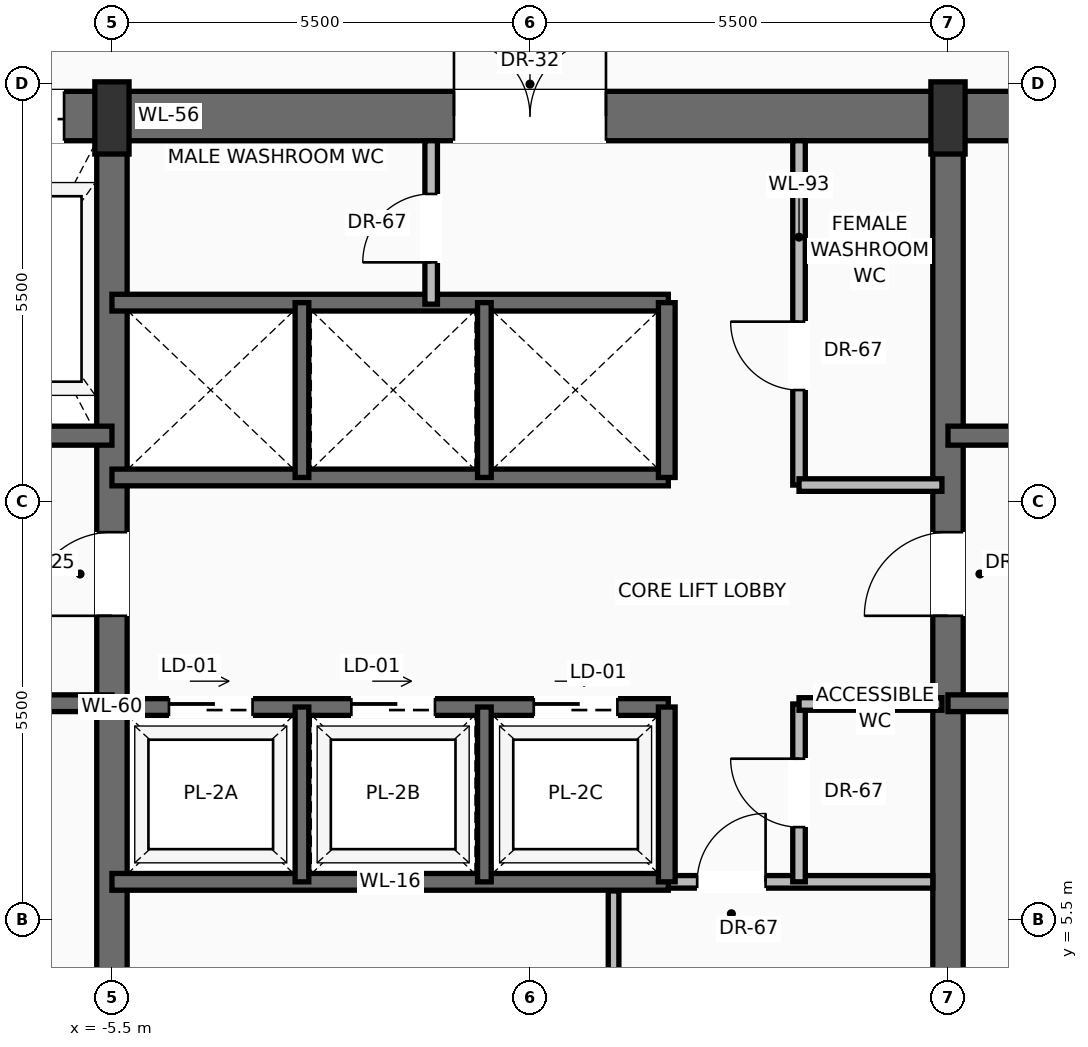
"""IFC4 building model, lengths in metres.
Left out: names, types, materials, properties, quantities, classifications, styles, units other than length and angle.
Written with IfcOpenShell. Run it as: python <this file> out.ifc"""

import sys

from ifc_helpers import new_model, si_unit, direction, frame, frame_2d, origin, origin_2d, place, context, subcontext, project, spatial, rectangle, extrude, source, transform, mapped, element, fill, save


model = new_model("IFC4")
c1 = context("Model", 3, precision=1e-05, world=origin(), true_north=direction((0.0, 1.0)))
c2 = subcontext(c1, "Body", "Model", "MODEL_VIEW")
j1 = project(units=[si_unit("LENGTHUNIT", "METRE"), si_unit("PLANEANGLEUNIT", "RADIAN")], contexts=[c1])
p1 = place(None, origin())
s1 = spatial("IfcSite", under=j1, at=p1, CompositionType="ELEMENT")
p2 = place(p1, origin())
s2 = spatial("IfcBuilding", under=s1, at=p2, CompositionType="ELEMENT")
p3 = place(p2, frame((0.0, 0.0, 178.4)))
s3 = spatial("IfcBuildingStorey", under=s2, at=p3, CompositionType="ELEMENT", Elevation=178.4)
p4 = place(p3, frame((-10.8, 16.075, 0.0), z_axis=(0.0, 0.0, 1.0), x_axis=(1.0, 0.0, 0.0)))
e1 = element("IfcWall", 1, at=p4, inside=s3, PredefinedType="SHEAR", context=c2, shape_type="SweptSolid", body=[
    extrude(rectangle(XDim=21.6, YDim=0.65, at=frame_2d((10.8, 0.0))), origin(), (0.0, 0.0, 1.0), 3.47),
])
p5 = place(p4, frame((3.37, 0.0, 0.0)))
e2 = element("IfcOpeningElement", 2, at=p5, cuts=e1, PredefinedType="OPENING", context=c2, shape_type="SweptSolid", body=[
    extrude(rectangle(XDim=1.3, YDim=2.3, at=frame_2d((0.65, 1.15))), frame((0.0, 0.335, 0.0), z_axis=(0.0, -1.0, 0.0), x_axis=(1.0, 0.0, 0.0)), (0.0, 0.0, 1.0), 0.67),
])
p6 = place(p4, frame((9.8, 0.0, 0.0)))
e3 = element("IfcOpeningElement", 3, at=p6, cuts=e1, PredefinedType="OPENING", context=c2, shape_type="SweptSolid", body=[
    extrude(rectangle(XDim=2.0, YDim=2.4, at=frame_2d((1.0, 1.2))), frame((0.0, 0.335, 0.0), z_axis=(0.0, -1.0, 0.0), x_axis=(1.0, 0.0, 0.0)), (0.0, 0.0, 1.0), 0.67),
])
p7 = place(p3, frame((-5.5, 0.525, 0.0), z_axis=(0.0, 0.0, 1.0), x_axis=(0.0, 1.0, 0.0)))
e4 = element("IfcWall", 4, at=p7, inside=s3, PredefinedType="SHEAR", context=c2, shape_type="SweptSolid", body=[
    extrude(rectangle(XDim=15.55, YDim=0.4, at=frame_2d((7.775, 0.0))), origin(), (0.0, 0.0, 1.0), 3.47),
])
p8 = place(p7, frame((8.975, 0.0, 0.0)))
e5 = element("IfcOpeningElement", 5, at=p8, cuts=e4, PredefinedType="OPENING", context=c2, shape_type="SweptSolid", body=[
    extrude(rectangle(XDim=1.1, YDim=2.2, at=frame_2d((0.55, 1.1))), frame((0.0, 0.21, 0.0), z_axis=(0.0, -1.0, 0.0), x_axis=(1.0, 0.0, 0.0)), (0.0, 0.0, 1.0), 0.42),
])
p9 = place(p3, frame((5.5, 0.525, 0.0), z_axis=(0.0, 0.0, 1.0), x_axis=(0.0, 1.0, 0.0)))
e6 = element("IfcWall", 6, at=p9, inside=s3, PredefinedType="SHEAR", context=c2, shape_type="SweptSolid", body=[
    extrude(rectangle(XDim=15.55, YDim=0.4, at=frame_2d((7.775, 0.0))), origin(), (0.0, 0.0, 1.0), 3.47),
])
p10 = place(p9, frame((8.975, 0.0, 0.0)))
e7 = element("IfcOpeningElement", 7, at=p10, cuts=e6, PredefinedType="OPENING", context=c2, shape_type="SweptSolid", body=[
    extrude(rectangle(XDim=1.1, YDim=2.2, at=frame_2d((0.55, 1.1))), frame((0.0, 0.21, 0.0), z_axis=(0.0, -1.0, 0.0), x_axis=(1.0, 0.0, 0.0)), (0.0, 0.0, 1.0), 0.42),
])
m1 = source(origin(), c2, "Body", "SweptSolid", [
    extrude(rectangle(XDim=0.45, YDim=0.95, at=origin_2d()), origin(), (0.0, 0.0, 1.0), 3.7),
])
for number, where, z_axis, x_axis in (
    (8, (-5.5, 16.05, 0.0), (0.0, 0.0, 1.0), (1.0, 0.0, 0.0)),
    (9, (5.5, 16.05, 0.0), (0.0, 0.0, 1.0), (1.0, 0.0, 0.0)),
):
    element("IfcColumn", number, at=place(p3, frame(where, z_axis=z_axis, x_axis=x_axis)), inside=s3, PredefinedType="PILASTER", context=c2, shape_type="MappedRepresentation", body=[
        mapped(m1, transform((0.0, 0.0, 0.0), scale=1.0)),
    ])
p11 = place(p3, frame((-5.5, 8.35, 0.0), z_axis=(0.0, 0.0, 1.0), x_axis=(-1.0, 0.0, 0.0)))
e10 = element("IfcWall", 10, at=p11, inside=s3, PredefinedType="SOLIDWALL", context=c2, shape_type="SweptSolid", body=[
    extrude(rectangle(XDim=4.65, YDim=0.22, at=frame_2d((2.325, 0.0))), origin(), (0.0, 0.0, 1.0), 3.47),
])
p12 = place(p11, frame((2.5, 0.0, 0.0)))
e11 = element("IfcOpeningElement", 11, at=p12, cuts=e10, PredefinedType="OPENING", context=c2, shape_type="SweptSolid", body=[
    extrude(rectangle(XDim=1.15, YDim=2.2, at=frame_2d((0.575, 1.1))), frame((0.0, 0.12, 0.0), z_axis=(0.0, -1.0, 0.0), x_axis=(1.0, 0.0, 0.0)), (0.0, 0.0, 1.0), 0.24),
])
p13 = place(p3, frame((-5.5, 11.87, 0.0), z_axis=(0.0, 0.0, 1.0), x_axis=(-1.0, 0.0, 0.0)))
e12 = element("IfcWall", 12, at=p13, inside=s3, PredefinedType="SOLIDWALL", context=c2, shape_type="SweptSolid", body=[
    extrude(rectangle(XDim=4.65, YDim=0.25, at=frame_2d((2.325, 0.0))), origin(), (0.0, 0.0, 1.0), 3.47),
])
p14 = place(p13, frame((2.95, 0.0, 0.0)))
e13 = element("IfcOpeningElement", 13, at=p14, cuts=e12, PredefinedType="OPENING", context=c2, shape_type="SweptSolid", body=[
    extrude(rectangle(XDim=1.2, YDim=2.25, at=frame_2d((0.6, 1.125))), frame((0.0, 0.135, 0.0), z_axis=(0.0, -1.0, 0.0), x_axis=(1.0, 0.0, 0.0)), (0.0, 0.0, 1.0), 0.27),
])
p15 = place(p3, frame((10.15, 8.35, 0.0), z_axis=(0.0, 0.0, 1.0), x_axis=(-1.0, 0.0, 0.0)))
e14 = element("IfcWall", 14, at=p15, inside=s3, PredefinedType="SOLIDWALL", context=c2, shape_type="SweptSolid", body=[
    extrude(rectangle(XDim=4.65, YDim=0.22, at=frame_2d((2.325, 0.0))), origin(), (0.0, 0.0, 1.0), 3.47),
])
p16 = place(p15, frame((1.0, 0.0, 0.0)))
e15 = element("IfcOpeningElement", 15, at=p16, cuts=e14, PredefinedType="OPENING", context=c2, shape_type="SweptSolid", body=[
    extrude(rectangle(XDim=1.15, YDim=2.2, at=frame_2d((0.575, 1.1))), frame((0.0, 0.12, 0.0), z_axis=(0.0, -1.0, 0.0), x_axis=(1.0, 0.0, 0.0)), (0.0, 0.0, 1.0), 0.24),
])
p17 = place(p3, frame((10.15, 11.87, 0.0), z_axis=(0.0, 0.0, 1.0), x_axis=(-1.0, 0.0, 0.0)))
e16 = element("IfcWall", 16, at=p17, inside=s3, PredefinedType="SOLIDWALL", context=c2, shape_type="SweptSolid", body=[
    extrude(rectangle(XDim=4.65, YDim=0.25, at=frame_2d((2.325, 0.0))), origin(), (0.0, 0.0, 1.0), 3.47),
])
p18 = place(p17, frame((0.5, 0.0, 0.0)))
e17 = element("IfcOpeningElement", 17, at=p18, cuts=e16, PredefinedType="OPENING", context=c2, shape_type="SweptSolid", body=[
    extrude(rectangle(XDim=1.2, YDim=2.25, at=frame_2d((0.6, 1.125))), frame((0.0, 0.135, 0.0), z_axis=(0.0, -1.0, 0.0), x_axis=(1.0, 0.0, 0.0)), (0.0, 0.0, 1.0), 0.27),
])
p19 = place(p3, frame((1.82, 6.0, 0.0), z_axis=(0.0, 0.0, 1.0), x_axis=(1.0, 0.0, 0.0)))
e18 = element("IfcWall", 18, at=p19, inside=s3, PredefinedType="PARTITIONING", context=c2, shape_type="SweptSolid", body=[
    extrude(rectangle(XDim=3.48, YDim=0.165, at=frame_2d((1.74, 0.0))), origin(), (0.0, 0.0, 1.0), 3.462),
])
p20 = place(p19, frame((0.38, 0.0, 0.0)))
e19 = element("IfcOpeningElement", 19, at=p20, cuts=e18, PredefinedType="OPENING", context=c2, shape_type="SweptSolid", body=[
    extrude(rectangle(XDim=0.9, YDim=2.1, at=frame_2d((0.45, 1.05))), frame((0.0, 0.093, 0.0), z_axis=(0.0, -1.0, 0.0), x_axis=(1.0, 0.0, 0.0)), (0.0, 0.0, 1.0), 0.185),
])
p21 = place(p3, frame((1.1, 0.85, 0.0), z_axis=(0.0, 0.0, 1.0), x_axis=(0.0, 1.0, 0.0)))
e20 = element("IfcWall", 20, at=p21, inside=s3, PredefinedType="PARTITIONING", context=c2, shape_type="SweptSolid", body=[
    extrude(rectangle(XDim=5.03, YDim=0.14, at=frame_2d((2.515, 0.0))), origin(), (0.0, 0.0, 1.0), 3.462),
])
p22 = place(p21, frame((2.1, 0.0, 0.0)))
e21 = element("IfcOpeningElement", 21, at=p22, cuts=e20, PredefinedType="OPENING", context=c2, shape_type="SweptSolid", body=[
    extrude(rectangle(XDim=0.9, YDim=2.1, at=frame_2d((0.45, 1.05))), frame((0.0, 0.08, 0.0), z_axis=(0.0, -1.0, 0.0), x_axis=(1.0, 0.0, 0.0)), (0.0, 0.0, 1.0), 0.16),
])
p23 = place(p3, frame((3.54, 6.0, 0.0), z_axis=(0.0, 0.0, 1.0), x_axis=(0.0, 1.0, 0.0)))
e22 = element("IfcWall", 22, at=p23, inside=s3, PredefinedType="PARTITIONING", context=c2, shape_type="SweptSolid", body=[
    extrude(rectangle(XDim=2.34, YDim=0.165, at=frame_2d((1.17, 0.0))), origin(), (0.0, 0.0, 1.0), 3.462),
])
p24 = place(p23, frame((0.72, 0.0, 0.0)))
e23 = element("IfcOpeningElement", 23, at=p24, cuts=e22, PredefinedType="OPENING", context=c2, shape_type="SweptSolid", body=[
    extrude(rectangle(XDim=0.9, YDim=2.1, at=frame_2d((0.45, 1.05))), frame((0.0, 0.093, 0.0), z_axis=(0.0, -1.0, 0.0), x_axis=(1.0, 0.0, 0.0)), (0.0, 0.0, 1.0), 0.185),
])
p25 = place(p3, frame((3.54, 8.34, 0.0), z_axis=(0.0, 0.0, 1.0), x_axis=(1.0, 0.0, 0.0)))
e24 = element("IfcWall", 24, at=p25, inside=s3, PredefinedType="PARTITIONING", context=c2, shape_type="SweptSolid", body=[
    extrude(rectangle(XDim=1.88, YDim=0.165, at=frame_2d((0.94, 0.0))), origin(), (0.0, 0.0, 1.0), 3.462),
])
p26 = place(p3, frame((-5.5, 6.0, 0.0), z_axis=(0.0, 0.0, 1.0), x_axis=(1.0, 0.0, 0.0)))
e25 = element("IfcWall", 25, at=p26, inside=s3, PredefinedType="SOLIDWALL", context=c2, shape_type="SweptSolid", body=[
    extrude(rectangle(XDim=7.32, YDim=0.22, at=frame_2d((3.66, 0.0))), origin(), (0.0, 0.0, 1.0), 3.47),
])
p27 = place(p3, frame((-5.5, 8.3, 0.0), z_axis=(0.0, 0.0, 1.0), x_axis=(1.0, 0.0, 0.0)))
e26 = element("IfcWall", 26, at=p27, inside=s3, PredefinedType="SOLIDWALL", context=c2, shape_type="SweptSolid", body=[
    extrude(rectangle(XDim=7.32, YDim=0.22, at=frame_2d((3.66, 0.0))), origin(), (0.0, 0.0, 1.0), 3.47),
])
p28 = place(p27, frame((0.75, 0.0, 0.0)))
e27 = element("IfcOpeningElement", 27, at=p28, cuts=e26, PredefinedType="OPENING", context=c2, shape_type="SweptSolid", body=[
    extrude(rectangle(XDim=1.1, YDim=2.2, at=frame_2d((0.55, 1.1))), frame((0.0, 0.12, 0.0), z_axis=(0.0, -1.0, 0.0), x_axis=(1.0, 0.0, 0.0)), (0.0, 0.0, 1.0), 0.24),
])
p29 = place(p27, frame((3.15, 0.0, 0.0)))
e28 = element("IfcOpeningElement", 28, at=p29, cuts=e26, PredefinedType="OPENING", context=c2, shape_type="SweptSolid", body=[
    extrude(rectangle(XDim=1.1, YDim=2.2, at=frame_2d((0.55, 1.1))), frame((0.0, 0.12, 0.0), z_axis=(0.0, -1.0, 0.0), x_axis=(1.0, 0.0, 0.0)), (0.0, 0.0, 1.0), 0.24),
])
p30 = place(p27, frame((5.55, 0.0, 0.0)))
e29 = element("IfcOpeningElement", 29, at=p30, cuts=e26, PredefinedType="OPENING", context=c2, shape_type="SweptSolid", body=[
    extrude(rectangle(XDim=1.1, YDim=2.2, at=frame_2d((0.55, 1.1))), frame((0.0, 0.12, 0.0), z_axis=(0.0, -1.0, 0.0), x_axis=(1.0, 0.0, 0.0)), (0.0, 0.0, 1.0), 0.24),
])
p31 = place(p3, frame((1.8, 6.0, 0.0), z_axis=(0.0, 0.0, 1.0), x_axis=(0.0, 1.0, 0.0)))
e30 = element("IfcWall", 30, at=p31, inside=s3, PredefinedType="SOLIDWALL", context=c2, shape_type="SweptSolid", body=[
    extrude(rectangle(XDim=2.3, YDim=0.22, at=frame_2d((1.15, 0.0))), origin(), (0.0, 0.0, 1.0), 3.47),
])
for number, where, z_axis, x_axis in (
    (31, (-3.0, 6.0, 0.0), (0.0, 0.0, 1.0), (0.0, 1.0, 0.0)),
    (32, (-0.6, 6.0, 0.0), (0.0, 0.0, 1.0), (0.0, 1.0, 0.0)),
):
    element("IfcWall", number, at=place(p3, frame(where, z_axis=z_axis, x_axis=x_axis)), inside=s3, PredefinedType="SOLIDWALL", context=c2, shape_type="SweptSolid", body=[
        extrude(rectangle(XDim=2.3, YDim=0.18, at=frame_2d((1.15, 0.0))), origin(), (0.0, 0.0, 1.0), 3.47),
    ])
for number, where, z_axis, x_axis in (
    (33, (-5.5, 11.32, 0.0), (0.0, 0.0, 1.0), (1.0, 0.0, 0.0)),
    (34, (-5.5, 13.62, 0.0), (0.0, 0.0, 1.0), (1.0, 0.0, 0.0)),
):
    element("IfcWall", number, at=place(p3, frame(where, z_axis=z_axis, x_axis=x_axis)), inside=s3, PredefinedType="SOLIDWALL", context=c2, shape_type="SweptSolid", body=[
        extrude(rectangle(XDim=7.32, YDim=0.22, at=frame_2d((3.66, 0.0))), origin(), (0.0, 0.0, 1.0), 3.47),
    ])
p32 = place(p3, frame((1.8, 11.32, 0.0), z_axis=(0.0, 0.0, 1.0), x_axis=(0.0, 1.0, 0.0)))
e35 = element("IfcWall", 35, at=p32, inside=s3, PredefinedType="SOLIDWALL", context=c2, shape_type="SweptSolid", body=[
    extrude(rectangle(XDim=2.3, YDim=0.22, at=frame_2d((1.15, 0.0))), origin(), (0.0, 0.0, 1.0), 3.47),
])
for number, where, z_axis, x_axis in (
    (36, (-3.0, 11.32, 0.0), (0.0, 0.0, 1.0), (0.0, 1.0, 0.0)),
    (37, (-0.6, 11.32, 0.0), (0.0, 0.0, 1.0), (0.0, 1.0, 0.0)),
):
    element("IfcWall", number, at=place(p3, frame(where, z_axis=z_axis, x_axis=x_axis)), inside=s3, PredefinedType="SOLIDWALL", context=c2, shape_type="SweptSolid", body=[
        extrude(rectangle(XDim=2.3, YDim=0.18, at=frame_2d((1.15, 0.0))), origin(), (0.0, 0.0, 1.0), 3.47),
    ])
p33 = place(p3, frame((-1.3, 13.6, 0.0), z_axis=(0.0, 0.0, 1.0), x_axis=(0.0, 1.0, 0.0)))
e38 = element("IfcWall", 38, at=p33, inside=s3, PredefinedType="PARTITIONING", context=c2, shape_type="SweptSolid", body=[
    extrude(rectangle(XDim=2.15, YDim=0.165, at=frame_2d((1.075, 0.0))), origin(), (0.0, 0.0, 1.0), 3.462),
])
p34 = place(p33, frame((0.55, 0.0, 0.0)))
e39 = element("IfcOpeningElement", 39, at=p34, cuts=e38, PredefinedType="OPENING", context=c2, shape_type="SweptSolid", body=[
    extrude(rectangle(XDim=0.9, YDim=2.1, at=frame_2d((0.45, 1.05))), frame((0.0, 0.093, 0.0), z_axis=(0.0, -1.0, 0.0), x_axis=(1.0, 0.0, 0.0)), (0.0, 0.0, 1.0), 0.185),
])
p35 = place(p3, frame((3.54, 11.22, 0.0), z_axis=(0.0, 0.0, 1.0), x_axis=(0.0, 1.0, 0.0)))
e40 = element("IfcWall", 40, at=p35, inside=s3, PredefinedType="PARTITIONING", context=c2, shape_type="SweptSolid", body=[
    extrude(rectangle(XDim=4.53, YDim=0.165, at=frame_2d((2.265, 0.0))), origin(), (0.0, 0.0, 1.0), 3.462),
])
p36 = place(p35, frame((1.25, 0.0, 0.0)))
e41 = element("IfcOpeningElement", 41, at=p36, cuts=e40, PredefinedType="OPENING", context=c2, shape_type="SweptSolid", body=[
    extrude(rectangle(XDim=0.9, YDim=2.1, at=frame_2d((0.45, 1.05))), frame((0.0, 0.093, 0.0), z_axis=(0.0, -1.0, 0.0), x_axis=(1.0, 0.0, 0.0)), (0.0, 0.0, 1.0), 0.185),
])
p37 = place(p3, frame((3.54, 11.22, 0.0), z_axis=(0.0, 0.0, 1.0), x_axis=(1.0, 0.0, 0.0)))
e42 = element("IfcWall", 42, at=p37, inside=s3, PredefinedType="PARTITIONING", context=c2, shape_type="SweptSolid", body=[
    extrude(rectangle(XDim=1.88, YDim=0.165, at=frame_2d((0.94, 0.0))), origin(), (0.0, 0.0, 1.0), 3.462),
])
m2 = source(origin(), c2, "Body", "SweptSolid", [
    extrude(rectangle(XDim=1.1, YDim=2.2, at=frame_2d((0.55, 1.1))), frame((0.0, 0.025, 0.0), z_axis=(0.0, -1.0, 0.0), x_axis=(1.0, 0.0, 0.0)), (0.0, 0.0, 1.0), 0.05),
])
p38 = place(p8, origin())
e43 = element("IfcDoor", 43, at=p38, inside=s3, OperationType="SINGLE_SWING_LEFT", PredefinedType="DOOR", context=c2, shape_type="MappedRepresentation", body=[
    mapped(m2, transform((0.0, 0.0, 0.0), scale=1.0)),
])
fill(e5, e43)
m3 = source(origin(), c2, "Body", "SweptSolid", [
    extrude(rectangle(XDim=1.3, YDim=2.3, at=frame_2d((0.65, 1.15))), frame((0.0, 0.025, 0.0), z_axis=(0.0, -1.0, 0.0), x_axis=(1.0, 0.0, 0.0)), (0.0, 0.0, 1.0), 0.05),
])
p39 = place(p5, origin())
e44 = element("IfcDoor", 44, at=p39, inside=s3, OperationType="SLIDING_TO_RIGHT", PredefinedType="DOOR", context=c2, shape_type="MappedRepresentation", body=[
    mapped(m3, transform((0.0, 0.0, 0.0), scale=1.0)),
])
fill(e2, e44)
p40 = place(p10, origin())
e45 = element("IfcDoor", 45, at=p40, inside=s3, OperationType="SINGLE_SWING_LEFT", PredefinedType="DOOR", context=c2, shape_type="MappedRepresentation", body=[
    mapped(m2, transform((0.0, 0.0, 0.0), scale=1.0)),
])
fill(e7, e45)
m4 = source(origin(), c2, "Body", "SweptSolid", [
    extrude(rectangle(XDim=2.0, YDim=2.4, at=frame_2d((1.0, 1.2))), frame((0.0, 0.025, 0.0), z_axis=(0.0, -1.0, 0.0), x_axis=(1.0, 0.0, 0.0)), (0.0, 0.0, 1.0), 0.05),
])
p41 = place(p6, origin())
e46 = element("IfcDoor", 46, at=p41, inside=s3, OperationType="DOUBLE_DOOR_SINGLE_SWING", PredefinedType="DOOR", context=c2, shape_type="MappedRepresentation", body=[
    mapped(m4, transform((0.0, 0.0, 0.0), scale=1.0)),
])
fill(e3, e46)
m5 = source(origin(), c2, "Body", "SweptSolid", [
    extrude(rectangle(XDim=0.9, YDim=2.1, at=frame_2d((0.45, 1.05))), frame((0.0, 0.025, 0.0), z_axis=(0.0, -1.0, 0.0), x_axis=(1.0, 0.0, 0.0)), (0.0, 0.0, 1.0), 0.05),
])
p42 = place(p20, origin())
e47 = element("IfcDoor", 47, at=p42, inside=s3, OperationType="SINGLE_SWING_RIGHT", PredefinedType="DOOR", context=c2, shape_type="MappedRepresentation", body=[
    mapped(m5, transform((0.0, 0.0, 0.0), scale=1.0)),
])
fill(e19, e47)
p43 = place(p24, origin())
e48 = element("IfcDoor", 48, at=p43, inside=s3, OperationType="SINGLE_SWING_RIGHT", PredefinedType="DOOR", context=c2, shape_type="MappedRepresentation", body=[
    mapped(m5, transform((0.0, 0.0, 0.0), scale=1.0)),
])
fill(e23, e48)
m6 = source(origin(), c2, "Body", "SweptSolid", [
    extrude(rectangle(XDim=1.1, YDim=2.2, at=frame_2d((0.55, 1.1))), frame((0.0, 0.025, 0.0), z_axis=(0.0, -1.0, 0.0), x_axis=(1.0, 0.0, 0.0)), (0.0, 0.0, 1.0), 0.05),
])
p44 = place(p28, origin())
e49 = element("IfcDoor", 49, at=p44, inside=s3, OperationType="SLIDING_TO_LEFT", PredefinedType="DOOR", context=c2, shape_type="MappedRepresentation", body=[
    mapped(m6, transform((0.0, 0.0, 0.0), scale=1.0)),
])
fill(e27, e49)
p45 = place(p29, origin())
e50 = element("IfcDoor", 50, at=p45, inside=s3, OperationType="SLIDING_TO_LEFT", PredefinedType="DOOR", context=c2, shape_type="MappedRepresentation", body=[
    mapped(m6, transform((0.0, 0.0, 0.0), scale=1.0)),
])
fill(e28, e50)
p46 = place(p30, origin())
e51 = element("IfcDoor", 51, at=p46, inside=s3, OperationType="SLIDING_TO_LEFT", PredefinedType="DOOR", context=c2, shape_type="MappedRepresentation", body=[
    mapped(m6, transform((0.0, 0.0, 0.0), scale=1.0)),
])
fill(e29, e51)
p47 = place(p34, origin())
e52 = element("IfcDoor", 52, at=p47, inside=s3, OperationType="SINGLE_SWING_LEFT", PredefinedType="DOOR", context=c2, shape_type="MappedRepresentation", body=[
    mapped(m5, transform((0.0, 0.0, 0.0), scale=1.0)),
])
fill(e39, e52)
p48 = place(p36, origin())
e53 = element("IfcDoor", 53, at=p48, inside=s3, OperationType="SINGLE_SWING_RIGHT", PredefinedType="DOOR", context=c2, shape_type="MappedRepresentation", body=[
    mapped(m5, transform((0.0, 0.0, 0.0), scale=1.0)),
])
fill(e41, e53)
save(model, sys.argv[1])
